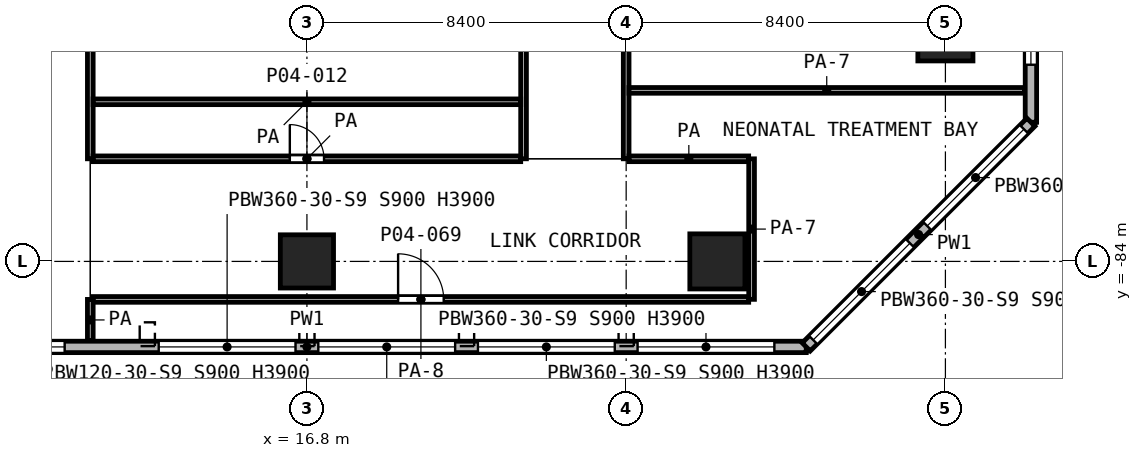
"""IFC4 building model, lengths in metres.
Left out: names, types, materials, properties, quantities, classifications, styles, units other than length and angle.
Written with IfcOpenShell. Run it as: python <this file> out.ifc"""

import sys

from ifc_helpers import new_model, si_unit, direction, frame, frame_2d, origin, origin_2d, place, context, subcontext, project, spatial, rectangle, extrude, element, fill, save


model = new_model("IFC4")
c1 = context("Model", 3, precision=1e-05, world=origin(), true_north=direction((0.0, 1.0)))
c2 = subcontext(c1, "Body", "Model", "MODEL_VIEW")
j1 = project(units=[si_unit("LENGTHUNIT", "METRE"), si_unit("PLANEANGLEUNIT", "RADIAN")], contexts=[c1])
p1 = place(None, origin())
s1 = spatial("IfcSite", under=j1, at=p1, CompositionType="ELEMENT")
p2 = place(p1, origin())
s2 = spatial("IfcBuilding", under=s1, at=p2, CompositionType="ELEMENT")
p3 = place(p2, frame((0.0, 0.0, 18.2)))
s3 = spatial("IfcBuildingStorey", under=s2, at=p3, CompositionType="ELEMENT", Elevation=18.2)
p4 = place(p3, frame((33.6, -78.0, 0.0), z_axis=(0.0, 0.0, 1.0), x_axis=(1.0, 0.0, 0.0)))
e1 = element("IfcColumn", 1, at=p4, inside=s3, PredefinedType="COLUMN", context=c2, shape_type="SweptSolid", body=[
    extrude(rectangle(XDim=1.45, YDim=1.45, at=origin_2d()), origin(), (0.0, 0.0, 1.0), 5.6),
])
p5 = place(p3, frame((16.8, -84.0, 0.0), z_axis=(0.0, 0.0, 1.0), x_axis=(1.0, 0.0, 0.0)))
e2 = element("IfcColumn", 2, at=p5, inside=s3, PredefinedType="COLUMN", context=c2, shape_type="SweptSolid", body=[
    extrude(rectangle(XDim=1.4, YDim=1.4, at=origin_2d()), origin(), (0.0, 0.0, 1.0), 5.6),
])
p6 = place(p3, frame((27.6, -84.0, 0.0), z_axis=(0.0, 0.0, 1.0), x_axis=(1.0, 0.0, 0.0)))
e3 = element("IfcColumn", 3, at=p6, inside=s3, PredefinedType="COLUMN", context=c2, shape_type="SweptSolid", body=[
    extrude(rectangle(XDim=1.45, YDim=1.45, at=origin_2d()), origin(), (0.0, 0.0, 1.0), 5.6),
])
p7 = place(p3, frame((35.85, -80.338, 0.0), z_axis=(0.0, 0.0, 1.0), x_axis=(0.0, 1.0, 0.0)))
e4 = element("IfcWall", 4, at=p7, inside=s3, PredefinedType="SOLIDWALL", context=c2, shape_type="SweptSolid", body=[
    extrude(rectangle(XDim=38.4, YDim=0.3, at=frame_2d((19.2, 0.0))), origin(), (0.0, 0.0, 1.0), 5.05),
])
p8 = place(p7, frame((1.513, 0.0, 0.9)))
e5 = element("IfcOpeningElement", 5, at=p8, cuts=e4, PredefinedType="OPENING", context=c2, shape_type="SweptSolid", body=[
    extrude(rectangle(XDim=2.4, YDim=3.0, at=frame_2d((1.2, 1.5))), frame((0.0, 0.16, 0.0), z_axis=(0.0, -1.0, 0.0), x_axis=(1.0, 0.0, 0.0)), (0.0, 0.0, 1.0), 0.32),
])
p9 = place(p7, frame((5.038, 0.0, 0.9)))
e6 = element("IfcOpeningElement", 6, at=p9, cuts=e4, PredefinedType="OPENING", context=c2, shape_type="SweptSolid", body=[
    extrude(rectangle(XDim=3.6, YDim=3.0, at=frame_2d((1.8, 1.5))), frame((0.0, 0.16, 0.0), z_axis=(0.0, -1.0, 0.0), x_axis=(1.0, 0.0, 0.0)), (0.0, 0.0, 1.0), 0.32),
])
p10 = place(p7, frame((9.238, 0.0, 0.9)))
e7 = element("IfcOpeningElement", 7, at=p10, cuts=e4, PredefinedType="OPENING", context=c2, shape_type="SweptSolid", body=[
    extrude(rectangle(XDim=3.6, YDim=3.0, at=frame_2d((1.8, 1.5))), frame((0.0, 0.16, 0.0), z_axis=(0.0, -1.0, 0.0), x_axis=(1.0, 0.0, 0.0)), (0.0, 0.0, 1.0), 0.32),
])
p11 = place(p7, frame((13.438, 0.0, 0.9)))
e8 = element("IfcOpeningElement", 8, at=p11, cuts=e4, PredefinedType="OPENING", context=c2, shape_type="SweptSolid", body=[
    extrude(rectangle(XDim=3.6, YDim=3.0, at=frame_2d((1.8, 1.5))), frame((0.0, 0.16, 0.0), z_axis=(0.0, -1.0, 0.0), x_axis=(1.0, 0.0, 0.0)), (0.0, 0.0, 1.0), 0.32),
])
p12 = place(p7, frame((17.638, 0.0, 0.9)))
e9 = element("IfcOpeningElement", 9, at=p12, cuts=e4, PredefinedType="OPENING", context=c2, shape_type="SweptSolid", body=[
    extrude(rectangle(XDim=3.6, YDim=3.0, at=frame_2d((1.8, 1.5))), frame((0.0, 0.16, 0.0), z_axis=(0.0, -1.0, 0.0), x_axis=(1.0, 0.0, 0.0)), (0.0, 0.0, 1.0), 0.32),
])
p13 = place(p7, frame((21.838, 0.0, 0.9)))
e10 = element("IfcOpeningElement", 10, at=p13, cuts=e4, PredefinedType="OPENING", context=c2, shape_type="SweptSolid", body=[
    extrude(rectangle(XDim=3.6, YDim=3.0, at=frame_2d((1.8, 1.5))), frame((0.0, 0.16, 0.0), z_axis=(0.0, -1.0, 0.0), x_axis=(1.0, 0.0, 0.0)), (0.0, 0.0, 1.0), 0.32),
])
p14 = place(p7, frame((26.038, 0.0, 0.9)))
e11 = element("IfcOpeningElement", 11, at=p14, cuts=e4, PredefinedType="OPENING", context=c2, shape_type="SweptSolid", body=[
    extrude(rectangle(XDim=3.6, YDim=3.0, at=frame_2d((1.8, 1.5))), frame((0.0, 0.16, 0.0), z_axis=(0.0, -1.0, 0.0), x_axis=(1.0, 0.0, 0.0)), (0.0, 0.0, 1.0), 0.32),
])
p15 = place(p7, frame((30.238, 0.0, 0.9)))
e12 = element("IfcOpeningElement", 12, at=p15, cuts=e4, PredefinedType="OPENING", context=c2, shape_type="SweptSolid", body=[
    extrude(rectangle(XDim=3.6, YDim=3.0, at=frame_2d((1.8, 1.5))), frame((0.0, 0.16, 0.0), z_axis=(0.0, -1.0, 0.0), x_axis=(1.0, 0.0, 0.0)), (0.0, 0.0, 1.0), 0.32),
])
p16 = place(p7, frame((34.438, 0.0, 0.9)))
e13 = element("IfcOpeningElement", 13, at=p16, cuts=e4, PredefinedType="OPENING", context=c2, shape_type="SweptSolid", body=[
    extrude(rectangle(XDim=3.6, YDim=3.0, at=frame_2d((1.8, 1.5))), frame((0.0, 0.16, 0.0), z_axis=(0.0, -1.0, 0.0), x_axis=(1.0, 0.0, 0.0)), (0.0, 0.0, 1.0), 0.32),
])
p17 = place(p3, frame((3.662, -86.25, 0.0), z_axis=(0.0, 0.0, 1.0), x_axis=(1.0, 0.0, 0.0)))
e14 = element("IfcWall", 14, at=p17, inside=s3, PredefinedType="SOLIDWALL", context=c2, shape_type="SweptSolid", body=[
    extrude(rectangle(XDim=26.276, YDim=0.3, at=frame_2d((13.138, 0.0))), origin(), (0.0, 0.0, 1.0), 5.05),
])
p18 = place(p17, frame((0.838, 0.0, 0.9)))
e15 = element("IfcOpeningElement", 15, at=p18, cuts=e14, PredefinedType="OPENING", context=c2, shape_type="SweptSolid", body=[
    extrude(rectangle(XDim=3.6, YDim=3.0, at=frame_2d((1.8, 1.5))), frame((0.0, 0.16, 0.0), z_axis=(0.0, -1.0, 0.0), x_axis=(1.0, 0.0, 0.0)), (0.0, 0.0, 1.0), 0.32),
])
p19 = place(p17, frame((5.563, 0.0, 0.9)))
e16 = element("IfcOpeningElement", 16, at=p19, cuts=e14, PredefinedType="OPENING", context=c2, shape_type="SweptSolid", body=[
    extrude(rectangle(XDim=1.2, YDim=3.0, at=frame_2d((0.6, 1.5))), frame((0.0, 0.16, 0.0), z_axis=(0.0, -1.0, 0.0), x_axis=(1.0, 0.0, 0.0)), (0.0, 0.0, 1.0), 0.32),
])
p20 = place(p17, frame((9.238, 0.0, 0.9)))
e17 = element("IfcOpeningElement", 17, at=p20, cuts=e14, PredefinedType="OPENING", context=c2, shape_type="SweptSolid", body=[
    extrude(rectangle(XDim=3.6, YDim=3.0, at=frame_2d((1.8, 1.5))), frame((0.0, 0.16, 0.0), z_axis=(0.0, -1.0, 0.0), x_axis=(1.0, 0.0, 0.0)), (0.0, 0.0, 1.0), 0.32),
])
p21 = place(p17, frame((13.438, 0.0, 0.9)))
e18 = element("IfcOpeningElement", 18, at=p21, cuts=e14, PredefinedType="OPENING", context=c2, shape_type="SweptSolid", body=[
    extrude(rectangle(XDim=3.6, YDim=3.0, at=frame_2d((1.8, 1.5))), frame((0.0, 0.16, 0.0), z_axis=(0.0, -1.0, 0.0), x_axis=(1.0, 0.0, 0.0)), (0.0, 0.0, 1.0), 0.32),
])
p22 = place(p17, frame((17.638, 0.0, 0.9)))
e19 = element("IfcOpeningElement", 19, at=p22, cuts=e14, PredefinedType="OPENING", context=c2, shape_type="SweptSolid", body=[
    extrude(rectangle(XDim=3.6, YDim=3.0, at=frame_2d((1.8, 1.5))), frame((0.0, 0.16, 0.0), z_axis=(0.0, -1.0, 0.0), x_axis=(1.0, 0.0, 0.0)), (0.0, 0.0, 1.0), 0.32),
])
p23 = place(p17, frame((21.838, 0.0, 0.9)))
e20 = element("IfcOpeningElement", 20, at=p23, cuts=e14, PredefinedType="OPENING", context=c2, shape_type="SweptSolid", body=[
    extrude(rectangle(XDim=3.6, YDim=3.0, at=frame_2d((1.8, 1.5))), frame((0.0, 0.16, 0.0), z_axis=(0.0, -1.0, 0.0), x_axis=(1.0, 0.0, 0.0)), (0.0, 0.0, 1.0), 0.32),
])
p24 = place(p3, frame((29.938, -86.25, 0.0), z_axis=(0.0, 0.0, 1.0), x_axis=(0.707106781187, 0.707106781187, 0.0)))
e21 = element("IfcWall", 21, at=p24, inside=s3, PredefinedType="SOLIDWALL", context=c2, shape_type="SweptSolid", body=[
    extrude(rectangle(XDim=8.361, YDim=0.3, at=frame_2d((4.181, 0.0))), origin(), (0.0, 0.0, 1.0), 5.05),
])
p25 = place(p24, frame((0.259, 0.0, 0.9)))
e22 = element("IfcOpeningElement", 22, at=p25, cuts=e21, PredefinedType="OPENING", context=c2, shape_type="SweptSolid", body=[
    extrude(rectangle(XDim=3.6, YDim=3.0, at=frame_2d((1.8, 1.5))), frame((0.0, 0.16, 0.0), z_axis=(0.0, -1.0, 0.0), x_axis=(1.0, 0.0, 0.0)), (0.0, 0.0, 1.0), 0.32),
])
p26 = place(p24, frame((4.502, 0.0, 0.9)))
e23 = element("IfcOpeningElement", 23, at=p26, cuts=e21, PredefinedType="OPENING", context=c2, shape_type="SweptSolid", body=[
    extrude(rectangle(XDim=3.6, YDim=3.0, at=frame_2d((1.8, 1.5))), frame((0.0, 0.16, 0.0), z_axis=(0.0, -1.0, 0.0), x_axis=(1.0, 0.0, 0.0)), (0.0, 0.0, 1.0), 0.32),
])
p27 = place(p3, frame((11.175, -85.0, 0.0), z_axis=(0.0, 0.0, 1.0), x_axis=(1.0, 0.0, 0.0)))
e24 = element("IfcWall", 24, at=p27, inside=s3, PredefinedType="PARTITIONING", context=c2, shape_type="SweptSolid", body=[
    extrude(rectangle(XDim=17.249, YDim=0.15, at=frame_2d((8.625, 0.0))), origin(), (0.0, 0.0, 1.0), 4.15),
])
p28 = place(p27, frame((8.024, 0.0, 0.0)))
e25 = element("IfcOpeningElement", 25, at=p28, cuts=e24, PredefinedType="OPENING", context=c2, shape_type="SweptSolid", body=[
    extrude(rectangle(XDim=1.2, YDim=2.1, at=frame_2d((0.6, 1.05))), frame((0.0, 0.085, 0.0), z_axis=(0.0, -1.0, 0.0), x_axis=(1.0, 0.0, 0.0)), (0.0, 0.0, 1.0), 0.17),
])
p29 = place(p3, frame((11.175, -81.3, 0.0), z_axis=(0.0, 0.0, 1.0), x_axis=(1.0, 0.0, 0.0)))
e26 = element("IfcWall", 26, at=p29, inside=s3, PredefinedType="PARTITIONING", context=c2, shape_type="SweptSolid", body=[
    extrude(rectangle(XDim=11.25, YDim=0.15, at=frame_2d((5.625, 0.0))), origin(), (0.0, 0.0, 1.0), 5.05),
])
p30 = place(p29, frame((5.175, 0.0, 0.0)))
e27 = element("IfcOpeningElement", 27, at=p30, cuts=e26, PredefinedType="OPENING", context=c2, shape_type="SweptSolid", body=[
    extrude(rectangle(XDim=0.9, YDim=2.1, at=frame_2d((0.45, 1.05))), frame((0.0, 0.085, 0.0), z_axis=(0.0, -1.0, 0.0), x_axis=(1.0, 0.0, 0.0)), (0.0, 0.0, 1.0), 0.17),
])
p31 = place(p3, frame((25.275, -81.3, 0.0), z_axis=(0.0, 0.0, 1.0), x_axis=(1.0, 0.0, 0.0)))
e28 = element("IfcWall", 28, at=p31, inside=s3, PredefinedType="PARTITIONING", context=c2, shape_type="SweptSolid", body=[
    extrude(rectangle(XDim=3.148, YDim=0.15, at=frame_2d((1.574, 0.0))), origin(), (0.0, 0.0, 1.0), 5.05),
])
p32 = place(p3, frame((11.175, -79.8, 0.0), z_axis=(0.0, 0.0, 1.0), x_axis=(1.0, 0.0, 0.0)))
e29 = element("IfcWall", 29, at=p32, inside=s3, PredefinedType="PARTITIONING", context=c2, shape_type="SweptSolid", body=[
    extrude(rectangle(XDim=11.25, YDim=0.15, at=frame_2d((5.625, 0.0))), origin(), (0.0, 0.0, 1.0), 5.05),
])
p33 = place(p3, frame((25.275, -79.5, 0.0), z_axis=(0.0, 0.0, 1.0), x_axis=(1.0, 0.0, 0.0)))
e30 = element("IfcWall", 30, at=p33, inside=s3, PredefinedType="PARTITIONING", context=c2, shape_type="SweptSolid", body=[
    extrude(rectangle(XDim=10.405, YDim=0.15, at=frame_2d((5.203, 0.0))), origin(), (0.0, 0.0, 1.0), 3.65),
])
p34 = place(p3, frame((11.1, -86.08, 0.0), z_axis=(0.0, 0.0, 1.0), x_axis=(0.0, 1.0, 0.0)))
e31 = element("IfcWall", 31, at=p34, inside=s3, PredefinedType="PARTITIONING", context=c2, shape_type="SweptSolid", body=[
    extrude(rectangle(XDim=1.08, YDim=0.15, at=frame_2d((0.54, 0.0))), origin(), (0.0, 0.0, 1.0), 5.05),
])
p35 = place(p3, frame((11.1, -81.3, 0.0), z_axis=(0.0, 0.0, 1.0), x_axis=(0.0, 1.0, 0.0)))
e32 = element("IfcWall", 32, at=p35, inside=s3, PredefinedType="PARTITIONING", context=c2, shape_type="SweptSolid", body=[
    extrude(rectangle(XDim=51.9, YDim=0.15, at=frame_2d((25.95, 0.0))), origin(), (0.0, 0.0, 1.0), 5.05),
])
p36 = place(p35, frame((34.6, 0.0, 0.0)))
e33 = element("IfcOpeningElement", 33, at=p36, cuts=e32, PredefinedType="OPENING", context=c2, shape_type="SweptSolid", body=[
    extrude(rectangle(XDim=1.0, YDim=2.1, at=frame_2d((0.5, 1.05))), frame((0.0, 0.085, 0.0), z_axis=(0.0, -1.0, 0.0), x_axis=(1.0, 0.0, 0.0)), (0.0, 0.0, 1.0), 0.17),
])
p37 = place(p35, frame((26.2, 0.0, 0.0)))
e34 = element("IfcOpeningElement", 34, at=p37, cuts=e32, PredefinedType="OPENING", context=c2, shape_type="SweptSolid", body=[
    extrude(rectangle(XDim=1.0, YDim=2.1, at=frame_2d((0.5, 1.05))), frame((0.0, 0.085, 0.0), z_axis=(0.0, -1.0, 0.0), x_axis=(1.0, 0.0, 0.0)), (0.0, 0.0, 1.0), 0.17),
])
p38 = place(p35, frame((13.75, 0.0, 0.0)))
e35 = element("IfcOpeningElement", 35, at=p38, cuts=e32, PredefinedType="OPENING", context=c2, shape_type="SweptSolid", body=[
    extrude(rectangle(XDim=1.0, YDim=2.1, at=frame_2d((0.5, 1.05))), frame((0.0, 0.085, 0.0), z_axis=(0.0, -1.0, 0.0), x_axis=(1.0, 0.0, 0.0)), (0.0, 0.0, 1.0), 0.17),
])
p39 = place(p3, frame((22.5, -81.3, 0.0), z_axis=(0.0, 0.0, 1.0), x_axis=(0.0, 1.0, 0.0)))
e36 = element("IfcWall", 36, at=p39, inside=s3, PredefinedType="PARTITIONING", context=c2, shape_type="SweptSolid", body=[
    extrude(rectangle(XDim=56.1, YDim=0.15, at=frame_2d((28.05, 0.0))), origin(), (0.0, 0.0, 1.0), 5.05),
])
p40 = place(p39, frame((51.4, 0.0, 0.0)))
e37 = element("IfcOpeningElement", 37, at=p40, cuts=e36, PredefinedType="OPENING", context=c2, shape_type="SweptSolid", body=[
    extrude(rectangle(XDim=1.0, YDim=2.1, at=frame_2d((0.5, 1.05))), frame((0.0, 0.085, 0.0), z_axis=(0.0, -1.0, 0.0), x_axis=(1.0, 0.0, 0.0)), (0.0, 0.0, 1.0), 0.17),
])
p41 = place(p39, frame((43.0, 0.0, 0.0)))
e38 = element("IfcOpeningElement", 38, at=p41, cuts=e36, PredefinedType="OPENING", context=c2, shape_type="SweptSolid", body=[
    extrude(rectangle(XDim=1.0, YDim=2.1, at=frame_2d((0.5, 1.05))), frame((0.0, 0.085, 0.0), z_axis=(0.0, -1.0, 0.0), x_axis=(1.0, 0.0, 0.0)), (0.0, 0.0, 1.0), 0.17),
])
p42 = place(p39, frame((19.75, 0.0, 0.0)))
e39 = element("IfcOpeningElement", 39, at=p42, cuts=e36, PredefinedType="OPENING", context=c2, shape_type="SweptSolid", body=[
    extrude(rectangle(XDim=1.0, YDim=2.1, at=frame_2d((0.5, 1.05))), frame((0.0, 0.085, 0.0), z_axis=(0.0, -1.0, 0.0), x_axis=(1.0, 0.0, 0.0)), (0.0, 0.0, 1.0), 0.17),
])
p43 = place(p39, frame((5.5, 0.0, 0.0)))
e40 = element("IfcOpeningElement", 40, at=p43, cuts=e36, PredefinedType="OPENING", context=c2, shape_type="SweptSolid", body=[
    extrude(rectangle(XDim=1.0, YDim=2.1, at=frame_2d((0.5, 1.05))), frame((0.0, 0.085, 0.0), z_axis=(0.0, -1.0, 0.0), x_axis=(1.0, 0.0, 0.0)), (0.0, 0.0, 1.0), 0.17),
])
p44 = place(p3, frame((25.2, -81.3, 0.0), z_axis=(0.0, 0.0, 1.0), x_axis=(0.0, 1.0, 0.0)))
e41 = element("IfcWall", 41, at=p44, inside=s3, PredefinedType="PARTITIONING", context=c2, shape_type="SweptSolid", body=[
    extrude(rectangle(XDim=56.1, YDim=0.15, at=frame_2d((28.05, 0.0))), origin(), (0.0, 0.0, 1.0), 5.05),
])
p45 = place(p44, frame((48.5, 0.0, 0.0)))
e42 = element("IfcOpeningElement", 42, at=p45, cuts=e41, PredefinedType="OPENING", context=c2, shape_type="SweptSolid", body=[
    extrude(rectangle(XDim=1.2, YDim=2.1, at=frame_2d((0.6, 1.05))), frame((0.0, 0.085, 0.0), z_axis=(0.0, -1.0, 0.0), x_axis=(1.0, 0.0, 0.0)), (0.0, 0.0, 1.0), 0.17),
])
p46 = place(p44, frame((40.1, 0.0, 0.0)))
e43 = element("IfcOpeningElement", 43, at=p46, cuts=e41, PredefinedType="OPENING", context=c2, shape_type="SweptSolid", body=[
    extrude(rectangle(XDim=1.2, YDim=2.1, at=frame_2d((0.6, 1.05))), frame((0.0, 0.085, 0.0), z_axis=(0.0, -1.0, 0.0), x_axis=(1.0, 0.0, 0.0)), (0.0, 0.0, 1.0), 0.17),
])
p47 = place(p44, frame((37.3, 0.0, 0.0)))
e44 = element("IfcOpeningElement", 44, at=p47, cuts=e41, PredefinedType="OPENING", context=c2, shape_type="SweptSolid", body=[
    extrude(rectangle(XDim=1.2, YDim=2.1, at=frame_2d((0.6, 1.05))), frame((0.0, 0.085, 0.0), z_axis=(0.0, -1.0, 0.0), x_axis=(1.0, 0.0, 0.0)), (0.0, 0.0, 1.0), 0.17),
])
p48 = place(p44, frame((28.9, 0.0, 0.0)))
e45 = element("IfcOpeningElement", 45, at=p48, cuts=e41, PredefinedType="OPENING", context=c2, shape_type="SweptSolid", body=[
    extrude(rectangle(XDim=1.2, YDim=2.1, at=frame_2d((0.6, 1.05))), frame((0.0, 0.085, 0.0), z_axis=(0.0, -1.0, 0.0), x_axis=(1.0, 0.0, 0.0)), (0.0, 0.0, 1.0), 0.17),
])
p49 = place(p44, frame((23.3, 0.0, 0.0)))
e46 = element("IfcOpeningElement", 46, at=p49, cuts=e41, PredefinedType="OPENING", context=c2, shape_type="SweptSolid", body=[
    extrude(rectangle(XDim=1.2, YDim=2.1, at=frame_2d((0.6, 1.05))), frame((0.0, 0.085, 0.0), z_axis=(0.0, -1.0, 0.0), x_axis=(1.0, 0.0, 0.0)), (0.0, 0.0, 1.0), 0.17),
])
p50 = place(p44, frame((20.6, 0.0, 0.0)))
e47 = element("IfcOpeningElement", 47, at=p50, cuts=e41, PredefinedType="OPENING", context=c2, shape_type="SweptSolid", body=[
    extrude(rectangle(XDim=1.1, YDim=2.1, at=frame_2d((0.55, 1.05))), frame((0.0, 0.085, 0.0), z_axis=(0.0, -1.0, 0.0), x_axis=(1.0, 0.0, 0.0)), (0.0, 0.0, 1.0), 0.17),
])
p51 = place(p44, frame((14.9, 0.0, 0.0)))
e48 = element("IfcOpeningElement", 48, at=p51, cuts=e41, PredefinedType="OPENING", context=c2, shape_type="SweptSolid", body=[
    extrude(rectangle(XDim=1.1, YDim=2.1, at=frame_2d((0.55, 1.05))), frame((0.0, 0.085, 0.0), z_axis=(0.0, -1.0, 0.0), x_axis=(1.0, 0.0, 0.0)), (0.0, 0.0, 1.0), 0.17),
])
p52 = place(p44, frame((7.5, 0.0, 0.0)))
e49 = element("IfcOpeningElement", 49, at=p52, cuts=e41, PredefinedType="OPENING", context=c2, shape_type="SweptSolid", body=[
    extrude(rectangle(XDim=1.2, YDim=2.1, at=frame_2d((0.6, 1.05))), frame((0.0, 0.085, 0.0), z_axis=(0.0, -1.0, 0.0), x_axis=(1.0, 0.0, 0.0)), (0.0, 0.0, 1.0), 0.17),
])
p53 = place(p44, frame((11.7, 0.0, 0.0)))
e50 = element("IfcOpeningElement", 50, at=p53, cuts=e41, PredefinedType="OPENING", context=c2, shape_type="SweptSolid", body=[
    extrude(rectangle(XDim=1.2, YDim=2.1, at=frame_2d((0.6, 1.05))), frame((0.0, 0.085, 0.0), z_axis=(0.0, -1.0, 0.0), x_axis=(1.0, 0.0, 0.0)), (0.0, 0.0, 1.0), 0.17),
])
p54 = place(p44, frame((3.15, 0.0, 0.0)))
e51 = element("IfcOpeningElement", 51, at=p54, cuts=e41, PredefinedType="OPENING", context=c2, shape_type="SweptSolid", body=[
    extrude(rectangle(XDim=1.2, YDim=2.1, at=frame_2d((0.6, 1.05))), frame((0.0, 0.085, 0.0), z_axis=(0.0, -1.0, 0.0), x_axis=(1.0, 0.0, 0.0)), (0.0, 0.0, 1.0), 0.17),
])
p55 = place(p3, frame((28.5, -84.998, 0.0), z_axis=(0.0, 0.0, 1.0), x_axis=(0.0, 1.0, 0.0)))
e52 = element("IfcWall", 52, at=p55, inside=s3, PredefinedType="PARTITIONING", context=c2, shape_type="SweptSolid", body=[
    extrude(rectangle(XDim=3.697, YDim=0.15, at=frame_2d((1.849, 0.0))), origin(), (0.0, 0.0, 1.0), 3.65),
])
p56 = place(p8, origin())
e53 = element("IfcWindow", 53, at=p56, inside=s3, PartitioningType="SINGLE_PANEL", PredefinedType="WINDOW", context=c2, shape_type="SweptSolid", body=[
    extrude(rectangle(XDim=2.4, YDim=3.0, at=frame_2d((1.2, 1.5))), frame((0.0, 0.03, 0.0), z_axis=(0.0, -1.0, 0.0), x_axis=(1.0, 0.0, 0.0)), (0.0, 0.0, 1.0), 0.06),
])
fill(e5, e53)
p57 = place(p19, origin())
e54 = element("IfcWindow", 54, at=p57, inside=s3, PartitioningType="SINGLE_PANEL", PredefinedType="WINDOW", context=c2, shape_type="SweptSolid", body=[
    extrude(rectangle(XDim=1.2, YDim=3.0, at=frame_2d((0.6, 1.5))), frame((0.0, 0.03, 0.0), z_axis=(0.0, -1.0, 0.0), x_axis=(1.0, 0.0, 0.0)), (0.0, 0.0, 1.0), 0.06),
])
fill(e16, e54)
p58 = place(p20, origin())
e55 = element("IfcWindow", 55, at=p58, inside=s3, PartitioningType="SINGLE_PANEL", PredefinedType="WINDOW", context=c2, shape_type="SweptSolid", body=[
    extrude(rectangle(XDim=3.6, YDim=3.0, at=frame_2d((1.8, 1.5))), frame((0.0, 0.03, 0.0), z_axis=(0.0, -1.0, 0.0), x_axis=(1.0, 0.0, 0.0)), (0.0, 0.0, 1.0), 0.06),
])
fill(e17, e55)
p59 = place(p21, origin())
e56 = element("IfcWindow", 56, at=p59, inside=s3, PartitioningType="SINGLE_PANEL", PredefinedType="WINDOW", context=c2, shape_type="SweptSolid", body=[
    extrude(rectangle(XDim=3.6, YDim=3.0, at=frame_2d((1.8, 1.5))), frame((0.0, 0.03, 0.0), z_axis=(0.0, -1.0, 0.0), x_axis=(1.0, 0.0, 0.0)), (0.0, 0.0, 1.0), 0.06),
])
fill(e18, e56)
p60 = place(p22, origin())
e57 = element("IfcWindow", 57, at=p60, inside=s3, PartitioningType="SINGLE_PANEL", PredefinedType="WINDOW", context=c2, shape_type="SweptSolid", body=[
    extrude(rectangle(XDim=3.6, YDim=3.0, at=frame_2d((1.8, 1.5))), frame((0.0, 0.03, 0.0), z_axis=(0.0, -1.0, 0.0), x_axis=(1.0, 0.0, 0.0)), (0.0, 0.0, 1.0), 0.06),
])
fill(e19, e57)
p61 = place(p23, origin())
e58 = element("IfcWindow", 58, at=p61, inside=s3, PartitioningType="SINGLE_PANEL", PredefinedType="WINDOW", context=c2, shape_type="SweptSolid", body=[
    extrude(rectangle(XDim=3.6, YDim=3.0, at=frame_2d((1.8, 1.5))), frame((0.0, 0.03, 0.0), z_axis=(0.0, -1.0, 0.0), x_axis=(1.0, 0.0, 0.0)), (0.0, 0.0, 1.0), 0.06),
])
fill(e20, e58)
p62 = place(p25, origin())
e59 = element("IfcWindow", 59, at=p62, inside=s3, PartitioningType="SINGLE_PANEL", PredefinedType="WINDOW", context=c2, shape_type="SweptSolid", body=[
    extrude(rectangle(XDim=3.6, YDim=3.0, at=frame_2d((1.8, 1.5))), frame((0.0, 0.03, 0.0), z_axis=(0.0, -1.0, 0.0), x_axis=(1.0, 0.0, 0.0)), (0.0, 0.0, 1.0), 0.06),
])
fill(e22, e59)
p63 = place(p26, origin())
e60 = element("IfcWindow", 60, at=p63, inside=s3, PartitioningType="SINGLE_PANEL", PredefinedType="WINDOW", context=c2, shape_type="SweptSolid", body=[
    extrude(rectangle(XDim=3.6, YDim=3.0, at=frame_2d((1.8, 1.5))), frame((0.0, 0.03, 0.0), z_axis=(0.0, -1.0, 0.0), x_axis=(1.0, 0.0, 0.0)), (0.0, 0.0, 1.0), 0.06),
])
fill(e23, e60)
p64 = place(p30, origin())
e61 = element("IfcDoor", 61, at=p64, inside=s3, OperationType="SINGLE_SWING_LEFT", PredefinedType="DOOR", context=c2, shape_type="SweptSolid", body=[
    extrude(rectangle(XDim=0.9, YDim=2.1, at=frame_2d((0.45, 1.05))), frame((0.0, 0.025, 0.0), z_axis=(0.0, -1.0, 0.0), x_axis=(1.0, 0.0, 0.0)), (0.0, 0.0, 1.0), 0.05),
])
fill(e27, e61)
p65 = place(p28, origin())
e62 = element("IfcDoor", 62, at=p65, inside=s3, OperationType="SINGLE_SWING_LEFT", PredefinedType="DOOR", context=c2, shape_type="SweptSolid", body=[
    extrude(rectangle(XDim=1.2, YDim=2.1, at=frame_2d((0.6, 1.05))), frame((0.0, 0.025, 0.0), z_axis=(0.0, -1.0, 0.0), x_axis=(1.0, 0.0, 0.0)), (0.0, 0.0, 1.0), 0.05),
])
fill(e25, e62)
save(model, sys.argv[1])
